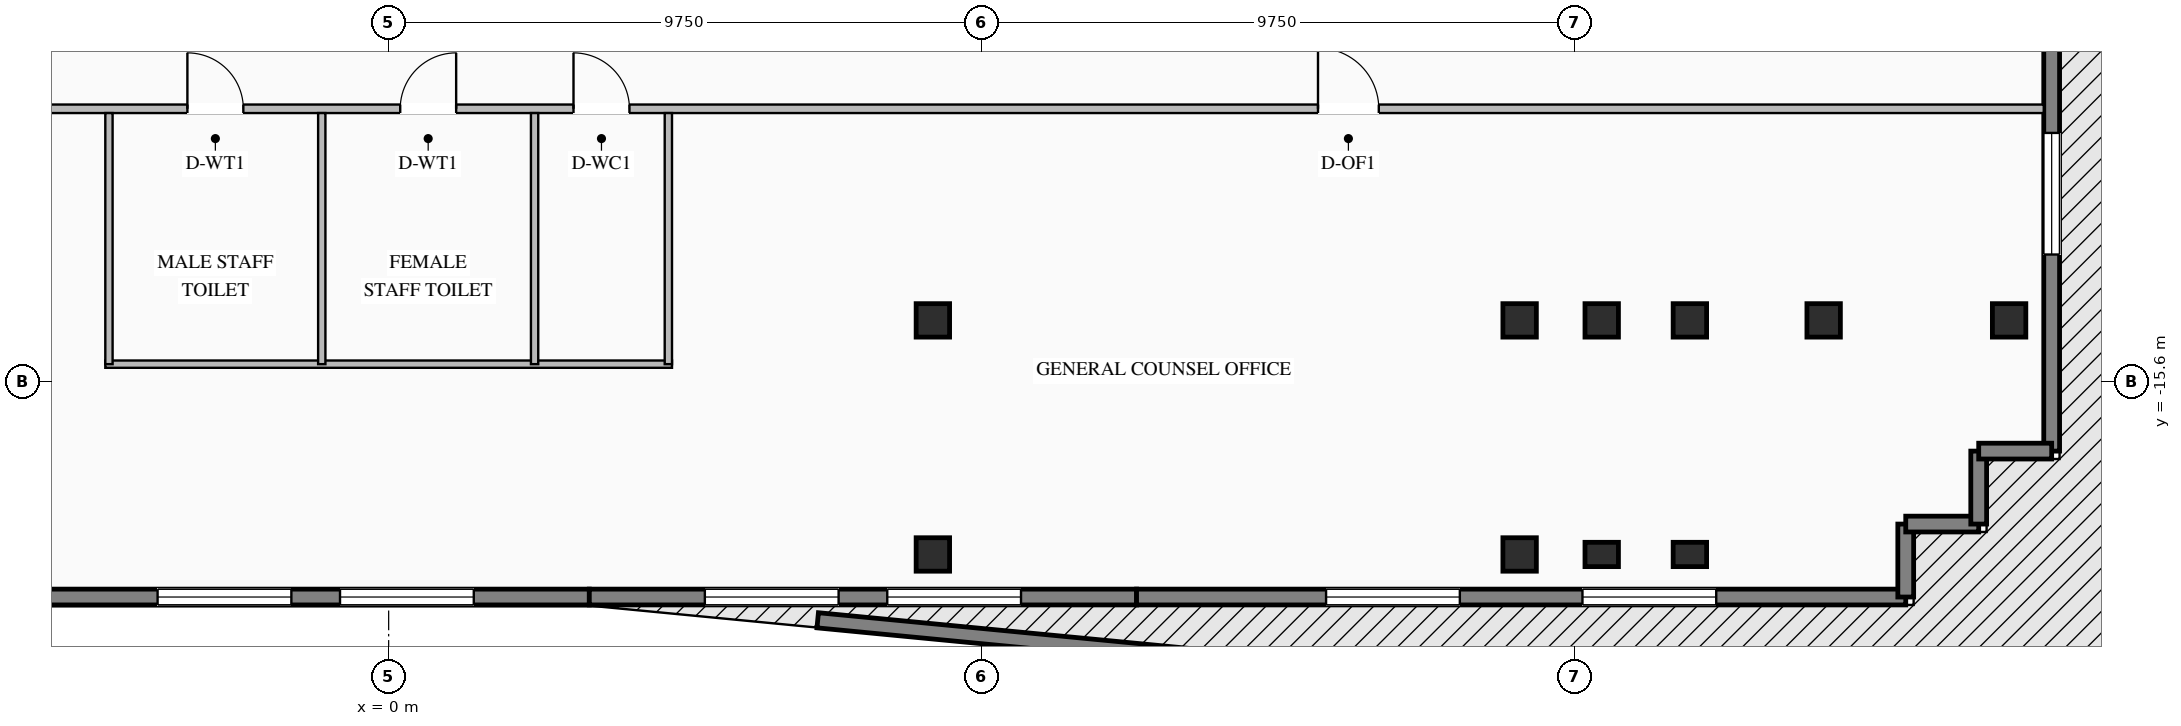
"""IFC4 building model, lengths in metres.
Left out: names, types, materials, properties, quantities, classifications, styles, units other than length and angle.
Written with IfcOpenShell. Run it as: python <this file> out.ifc"""

import sys

from ifc_helpers import new_model, si_unit, direction, frame, frame_2d, origin, origin_2d, place, context, subcontext, project, spatial, rectangle, i_section, extrude, element, fill, save


model = new_model("IFC4")
c1 = context("Model", 3, precision=1e-05, world=origin(), true_north=direction((0.0, 1.0)))
c2 = subcontext(c1, "Body", "Model", "MODEL_VIEW")
j1 = project(units=[si_unit("LENGTHUNIT", "METRE"), si_unit("PLANEANGLEUNIT", "RADIAN")], contexts=[c1])
p1 = place(None, origin())
s1 = spatial("IfcSite", under=j1, at=p1, CompositionType="ELEMENT")
p2 = place(p1, origin())
s2 = spatial("IfcBuilding", under=s1, at=p2, CompositionType="ELEMENT")
p3 = place(p2, frame((0.0, 0.0, 204.3)))
s3 = spatial("IfcBuildingStorey", under=s2, at=p3, CompositionType="ELEMENT", Elevation=204.3)
for number, where, z_axis, x_axis in (
    (1, (8.95, -14.6, 0.0), (0.0, 0.0, 1.0), (1.0, 0.0, 0.0)),
    (2, (18.6, -14.6, 0.0), (0.0, 0.0, 1.0), (1.0, 0.0, 0.0)),
    (3, (19.95, -14.6, 0.0), (0.0, 0.0, 1.0), (1.0, 0.0, 0.0)),
    (4, (21.4, -14.6, 0.0), (0.0, 0.0, 1.0), (1.0, 0.0, 0.0)),
    (5, (23.6, -14.6, 0.0), (0.0, 0.0, 1.0), (1.0, 0.0, 0.0)),
    (6, (8.95, -18.45, 0.0), (0.0, 0.0, 1.0), (1.0, 0.0, 0.0)),
):
    element("IfcColumn", number, at=place(p3, frame(where, z_axis=z_axis, x_axis=x_axis)), inside=s3, PredefinedType="COLUMN", context=c2, shape_type="SweptSolid", body=[
        extrude(i_section(OverallWidth=0.55, OverallDepth=0.55, WebThickness=0.024, FlangeThickness=0.036, at=origin_2d()), origin(), (0.0, 0.0, 1.0), 4.2),
    ])
for number, where, z_axis, x_axis in (
    (7, (18.6, -18.45, -0.28), (0.0, 0.0, 1.0), (1.0, 0.0, 0.0)),
    (8, (26.65, -14.6, -0.28), (0.0, 0.0, 1.0), (1.0, 0.0, 0.0)),
):
    element("IfcColumn", number, at=place(p3, frame(where, z_axis=z_axis, x_axis=x_axis)), inside=s3, PredefinedType="COLUMN", context=c2, shape_type="SweptSolid", body=[
        extrude(i_section(OverallWidth=0.55, OverallDepth=0.55, WebThickness=0.024, FlangeThickness=0.036, at=origin_2d()), origin(), (0.0, 0.0, 1.0), 4.48),
    ])
for number, where, z_axis, x_axis in (
    (9, (19.95, -18.45, -0.28), (0.0, 0.0, 1.0), (1.0, 0.0, 0.0)),
    (10, (21.4, -18.45, -0.28), (0.0, 0.0, 1.0), (1.0, 0.0, 0.0)),
):
    element("IfcColumn", number, at=place(p3, frame(where, z_axis=z_axis, x_axis=x_axis)), inside=s3, PredefinedType="PILASTER", context=c2, shape_type="SweptSolid", body=[
        extrude(rectangle(XDim=0.55, YDim=0.4, at=origin_2d()), origin(), (0.0, 0.0, 1.0), 4.48),
    ])
p4 = place(p3, frame((3.3, -19.15, 0.0), z_axis=(0.0, 0.0, 1.0), x_axis=(-1.0, 0.0, 0.0)))
e11 = element("IfcWall", 11, at=p4, inside=s3, PredefinedType="STANDARD", context=c2, shape_type="SweptSolid", body=[
    extrude(rectangle(XDim=9.0, YDim=0.26, at=frame_2d((4.5, 0.0))), origin(), (0.0, 0.0, 1.0), 4.0),
])
p5 = place(p4, frame((1.9, 0.0, 0.76)))
e12 = element("IfcOpeningElement", 12, at=p5, cuts=e11, PredefinedType="OPENING", context=c2, shape_type="SweptSolid", body=[
    extrude(rectangle(XDim=2.2, YDim=2.25, at=frame_2d((1.1, 1.125))), frame((0.0, 0.14, 0.0), z_axis=(0.0, -1.0, 0.0), x_axis=(1.0, 0.0, 0.0)), (0.0, 0.0, 1.0), 0.28),
])
p6 = place(p4, frame((4.9, 0.0, 0.76)))
e13 = element("IfcOpeningElement", 13, at=p6, cuts=e11, PredefinedType="OPENING", context=c2, shape_type="SweptSolid", body=[
    extrude(rectangle(XDim=2.2, YDim=2.25, at=frame_2d((1.1, 1.125))), frame((0.0, 0.14, 0.0), z_axis=(0.0, -1.0, 0.0), x_axis=(1.0, 0.0, 0.0)), (0.0, 0.0, 1.0), 0.28),
])
p7 = place(p3, frame((12.3, -19.15, 0.0), z_axis=(0.0, 0.0, 1.0), x_axis=(-1.0, 0.0, 0.0)))
e14 = element("IfcWall", 14, at=p7, inside=s3, PredefinedType="STANDARD", context=c2, shape_type="SweptSolid", body=[
    extrude(rectangle(XDim=9.0, YDim=0.26, at=frame_2d((4.5, 0.0))), origin(), (0.0, 0.0, 1.0), 4.0),
])
p8 = place(p7, frame((1.9, 0.0, 0.76)))
e15 = element("IfcOpeningElement", 15, at=p8, cuts=e14, PredefinedType="OPENING", context=c2, shape_type="SweptSolid", body=[
    extrude(rectangle(XDim=2.2, YDim=2.25, at=frame_2d((1.1, 1.125))), frame((0.0, 0.14, 0.0), z_axis=(0.0, -1.0, 0.0), x_axis=(1.0, 0.0, 0.0)), (0.0, 0.0, 1.0), 0.28),
])
p9 = place(p7, frame((4.9, 0.0, 0.76)))
e16 = element("IfcOpeningElement", 16, at=p9, cuts=e14, PredefinedType="OPENING", context=c2, shape_type="SweptSolid", body=[
    extrude(rectangle(XDim=2.2, YDim=2.25, at=frame_2d((1.1, 1.125))), frame((0.0, 0.14, 0.0), z_axis=(0.0, -1.0, 0.0), x_axis=(1.0, 0.0, 0.0)), (0.0, 0.0, 1.0), 0.28),
])
p10 = place(p3, frame((24.95, -19.15, 0.0), z_axis=(0.0, 0.0, 1.0), x_axis=(-1.0, 0.0, 0.0)))
e17 = element("IfcWall", 17, at=p10, inside=s3, PredefinedType="STANDARD", context=c2, shape_type="SweptSolid", body=[
    extrude(rectangle(XDim=12.65, YDim=0.26, at=frame_2d((6.325, 0.0))), origin(), (0.0, 0.0, 1.0), 4.0),
])
p11 = place(p10, frame((3.117, 0.0, 0.76)))
e18 = element("IfcOpeningElement", 18, at=p11, cuts=e17, PredefinedType="OPENING", context=c2, shape_type="SweptSolid", body=[
    extrude(rectangle(XDim=2.2, YDim=2.25, at=frame_2d((1.1, 1.125))), frame((0.0, 0.14, 0.0), z_axis=(0.0, -1.0, 0.0), x_axis=(1.0, 0.0, 0.0)), (0.0, 0.0, 1.0), 0.28),
])
p12 = place(p10, frame((7.333, 0.0, 0.76)))
e19 = element("IfcOpeningElement", 19, at=p12, cuts=e17, PredefinedType="OPENING", context=c2, shape_type="SweptSolid", body=[
    extrude(rectangle(XDim=2.2, YDim=2.25, at=frame_2d((1.1, 1.125))), frame((0.0, 0.14, 0.0), z_axis=(0.0, -1.0, 0.0), x_axis=(1.0, 0.0, 0.0)), (0.0, 0.0, 1.0), 0.28),
])
p13 = place(p3, frame((27.35, -0.9, 0.0), z_axis=(0.0, 0.0, 1.0), x_axis=(0.0, -1.0, 0.0)))
e20 = element("IfcWall", 20, at=p13, inside=s3, PredefinedType="STANDARD", context=c2, shape_type="SweptSolid", body=[
    extrude(rectangle(XDim=15.85, YDim=0.26, at=frame_2d((7.925, 0.0))), origin(), (0.0, 0.0, 1.0), 4.0),
])
p14 = place(p13, frame((4.283, 0.0, 0.76)))
e21 = element("IfcOpeningElement", 21, at=p14, cuts=e20, PredefinedType="OPENING", context=c2, shape_type="SweptSolid", body=[
    extrude(rectangle(XDim=2.0, YDim=2.05, at=frame_2d((1.0, 1.025))), frame((0.0, 0.14, 0.0), z_axis=(0.0, -1.0, 0.0), x_axis=(1.0, 0.0, 0.0)), (0.0, 0.0, 1.0), 0.28),
])
p15 = place(p13, frame((10.617, 0.0, 0.76)))
e22 = element("IfcOpeningElement", 22, at=p15, cuts=e20, PredefinedType="OPENING", context=c2, shape_type="SweptSolid", body=[
    extrude(rectangle(XDim=2.0, YDim=2.05, at=frame_2d((1.0, 1.025))), frame((0.0, 0.14, 0.0), z_axis=(0.0, -1.0, 0.0), x_axis=(1.0, 0.0, 0.0)), (0.0, 0.0, 1.0), 0.28),
])
for number, where, z_axis, x_axis in (
    (23, (24.95, -19.15, 0.0), (0.0, 0.0, 1.0), (0.0, 1.0, 0.0)),
    (24, (24.95, -17.95, 0.0), (0.0, 0.0, 1.0), (1.0, 0.0, 0.0)),
    (25, (26.15, -17.95, 0.0), (0.0, 0.0, 1.0), (0.0, 1.0, 0.0)),
):
    element("IfcWall", number, at=place(p3, frame(where, z_axis=z_axis, x_axis=x_axis)), inside=s3, PredefinedType="STANDARD", context=c2, shape_type="SweptSolid", body=[
        extrude(rectangle(XDim=1.2, YDim=0.26, at=frame_2d((0.6, 0.0))), origin(), (0.0, 0.0, 1.0), 4.0),
    ])
p16 = place(p3, frame((26.15, -16.75, 0.0), z_axis=(0.0, 0.0, 1.0), x_axis=(1.0, 0.0, 0.0)))
e26 = element("IfcWall", 26, at=p16, inside=s3, PredefinedType="STANDARD", context=c2, shape_type="SweptSolid", body=[
    extrude(rectangle(XDim=1.2, YDim=0.26, at=frame_2d((0.6, 0.0))), origin(), (0.0, 0.0, 1.0), 4.0),
])
p17 = place(p3, frame((29.579, -21.701, 0.0), z_axis=(0.0, 0.0, 1.0), x_axis=(-0.995396348801, 0.095844190195, 0.0)))
e27 = element("IfcWall", 27, at=p17, inside=s3, PredefinedType="PARAPET", context=c2, shape_type="SweptSolid", body=[
    extrude(rectangle(XDim=22.627, YDim=0.25, at=frame_2d((11.314, 0.0))), origin(), (0.0, 0.0, 1.0), 1.2),
])
p18 = place(p3, frame((-29.62, -11.12, 0.0), z_axis=(0.0, 0.0, 1.0), x_axis=(1.0, 0.0, 0.0)))
e28 = element("IfcWall", 28, at=p18, inside=s3, PredefinedType="STANDARD", context=c2, shape_type="SweptSolid", body=[
    extrude(rectangle(XDim=56.84, YDim=0.14, at=frame_2d((28.42, 0.0))), origin(), (0.0, 0.0, 1.0), 4.0),
])
p19 = place(p18, frame((26.31, 0.0, 0.0)))
e29 = element("IfcOpeningElement", 29, at=p19, cuts=e28, PredefinedType="OPENING", context=c2, shape_type="SweptSolid", body=[
    extrude(rectangle(XDim=0.92, YDim=2.08, at=frame_2d((0.46, 1.04))), frame((0.0, 0.08, 0.0), z_axis=(0.0, -1.0, 0.0), x_axis=(1.0, 0.0, 0.0)), (0.0, 0.0, 1.0), 0.16),
])
p20 = place(p18, frame((29.81, 0.0, 0.0)))
e30 = element("IfcOpeningElement", 30, at=p20, cuts=e28, PredefinedType="OPENING", context=c2, shape_type="SweptSolid", body=[
    extrude(rectangle(XDim=0.92, YDim=2.08, at=frame_2d((0.46, 1.04))), frame((0.0, 0.08, 0.0), z_axis=(0.0, -1.0, 0.0), x_axis=(1.0, 0.0, 0.0)), (0.0, 0.0, 1.0), 0.16),
])
p21 = place(p18, frame((32.66, 0.0, 0.0)))
e31 = element("IfcOpeningElement", 31, at=p21, cuts=e28, PredefinedType="OPENING", context=c2, shape_type="SweptSolid", body=[
    extrude(rectangle(XDim=0.92, YDim=2.08, at=frame_2d((0.46, 1.04))), frame((0.0, 0.08, 0.0), z_axis=(0.0, -1.0, 0.0), x_axis=(1.0, 0.0, 0.0)), (0.0, 0.0, 1.0), 0.16),
])
p22 = place(p18, frame((12.136, 0.0, 0.0)))
e32 = element("IfcOpeningElement", 32, at=p22, cuts=e28, PredefinedType="OPENING", context=c2, shape_type="SweptSolid", body=[
    extrude(rectangle(XDim=1.0, YDim=2.08, at=frame_2d((0.5, 1.04))), frame((0.0, 0.08, 0.0), z_axis=(0.0, -1.0, 0.0), x_axis=(1.0, 0.0, 0.0)), (0.0, 0.0, 1.0), 0.16),
])
p23 = place(p18, frame((44.904, 0.0, 0.0)))
e33 = element("IfcOpeningElement", 33, at=p23, cuts=e28, PredefinedType="OPENING", context=c2, shape_type="SweptSolid", body=[
    extrude(rectangle(XDim=1.0, YDim=2.08, at=frame_2d((0.5, 1.04))), frame((0.0, 0.08, 0.0), z_axis=(0.0, -1.0, 0.0), x_axis=(1.0, 0.0, 0.0)), (0.0, 0.0, 1.0), 0.16),
])
p24 = place(p3, frame((-4.66, -15.32, 0.0), z_axis=(0.0, 0.0, 1.0), x_axis=(1.0, 0.0, 0.0)))
e34 = element("IfcWall", 34, at=p24, inside=s3, PredefinedType="STANDARD", context=c2, shape_type="SweptSolid", body=[
    extrude(rectangle(XDim=9.32, YDim=0.12, at=frame_2d((4.66, 0.0))), origin(), (0.0, 0.0, 1.0), 4.0),
])
for number, where, z_axis, x_axis in (
    (35, (-4.6, -15.32, 0.0), (0.0, 0.0, 1.0), (0.0, 1.0, 0.0)),
    (36, (-1.1, -15.32, 0.0), (0.0, 0.0, 1.0), (0.0, 1.0, 0.0)),
    (37, (2.4, -15.32, 0.0), (0.0, 0.0, 1.0), (0.0, 1.0, 0.0)),
    (38, (4.6, -15.32, 0.0), (0.0, 0.0, 1.0), (0.0, 1.0, 0.0)),
):
    element("IfcWall", number, at=place(p3, frame(where, z_axis=z_axis, x_axis=x_axis)), inside=s3, PredefinedType="STANDARD", context=c2, shape_type="SweptSolid", body=[
        extrude(rectangle(XDim=4.13, YDim=0.12, at=frame_2d((2.065, 0.0))), origin(), (0.0, 0.0, 1.0), 4.0),
    ])
p25 = place(p5, origin())
e39 = element("IfcWindow", 39, at=p25, inside=s3, PartitioningType="DOUBLE_PANEL_VERTICAL", PredefinedType="WINDOW", context=c2, shape_type="SweptSolid", body=[
    extrude(rectangle(XDim=2.2, YDim=2.25, at=frame_2d((1.1, 1.125))), frame((0.0, 0.03, 0.0), z_axis=(0.0, -1.0, 0.0), x_axis=(1.0, 0.0, 0.0)), (0.0, 0.0, 1.0), 0.06),
])
fill(e12, e39)
p26 = place(p6, origin())
e40 = element("IfcWindow", 40, at=p26, inside=s3, PartitioningType="DOUBLE_PANEL_VERTICAL", PredefinedType="WINDOW", context=c2, shape_type="SweptSolid", body=[
    extrude(rectangle(XDim=2.2, YDim=2.25, at=frame_2d((1.1, 1.125))), frame((0.0, 0.03, 0.0), z_axis=(0.0, -1.0, 0.0), x_axis=(1.0, 0.0, 0.0)), (0.0, 0.0, 1.0), 0.06),
])
fill(e13, e40)
p27 = place(p8, origin())
e41 = element("IfcWindow", 41, at=p27, inside=s3, PartitioningType="DOUBLE_PANEL_VERTICAL", PredefinedType="WINDOW", context=c2, shape_type="SweptSolid", body=[
    extrude(rectangle(XDim=2.2, YDim=2.25, at=frame_2d((1.1, 1.125))), frame((0.0, 0.03, 0.0), z_axis=(0.0, -1.0, 0.0), x_axis=(1.0, 0.0, 0.0)), (0.0, 0.0, 1.0), 0.06),
])
fill(e15, e41)
p28 = place(p9, origin())
e42 = element("IfcWindow", 42, at=p28, inside=s3, PartitioningType="DOUBLE_PANEL_VERTICAL", PredefinedType="WINDOW", context=c2, shape_type="SweptSolid", body=[
    extrude(rectangle(XDim=2.2, YDim=2.25, at=frame_2d((1.1, 1.125))), frame((0.0, 0.03, 0.0), z_axis=(0.0, -1.0, 0.0), x_axis=(1.0, 0.0, 0.0)), (0.0, 0.0, 1.0), 0.06),
])
fill(e16, e42)
p29 = place(p11, origin())
e43 = element("IfcWindow", 43, at=p29, inside=s3, PartitioningType="DOUBLE_PANEL_VERTICAL", PredefinedType="WINDOW", context=c2, shape_type="SweptSolid", body=[
    extrude(rectangle(XDim=2.2, YDim=2.25, at=frame_2d((1.1, 1.125))), frame((0.0, 0.03, 0.0), z_axis=(0.0, -1.0, 0.0), x_axis=(1.0, 0.0, 0.0)), (0.0, 0.0, 1.0), 0.06),
])
fill(e18, e43)
p30 = place(p12, origin())
e44 = element("IfcWindow", 44, at=p30, inside=s3, PartitioningType="DOUBLE_PANEL_VERTICAL", PredefinedType="WINDOW", context=c2, shape_type="SweptSolid", body=[
    extrude(rectangle(XDim=2.2, YDim=2.25, at=frame_2d((1.1, 1.125))), frame((0.0, 0.03, 0.0), z_axis=(0.0, -1.0, 0.0), x_axis=(1.0, 0.0, 0.0)), (0.0, 0.0, 1.0), 0.06),
])
fill(e19, e44)
p31 = place(p15, origin())
e45 = element("IfcWindow", 45, at=p31, inside=s3, PartitioningType="DOUBLE_PANEL_VERTICAL", PredefinedType="WINDOW", context=c2, shape_type="SweptSolid", body=[
    extrude(rectangle(XDim=2.0, YDim=2.05, at=frame_2d((1.0, 1.025))), frame((0.0, 0.03, 0.0), z_axis=(0.0, -1.0, 0.0), x_axis=(1.0, 0.0, 0.0)), (0.0, 0.0, 1.0), 0.06),
])
fill(e22, e45)
p32 = place(p19, origin())
e46 = element("IfcDoor", 46, at=p32, inside=s3, OperationType="SINGLE_SWING_LEFT", PredefinedType="DOOR", context=c2, shape_type="SweptSolid", body=[
    extrude(rectangle(XDim=0.92, YDim=2.08, at=frame_2d((0.46, 1.04))), frame((0.0, 0.025, 0.0), z_axis=(0.0, -1.0, 0.0), x_axis=(1.0, 0.0, 0.0)), (0.0, 0.0, 1.0), 0.05),
])
fill(e29, e46)
p33 = place(p20, origin())
e47 = element("IfcDoor", 47, at=p33, inside=s3, OperationType="SINGLE_SWING_RIGHT", PredefinedType="DOOR", context=c2, shape_type="SweptSolid", body=[
    extrude(rectangle(XDim=0.92, YDim=2.08, at=frame_2d((0.46, 1.04))), frame((0.0, 0.025, 0.0), z_axis=(0.0, -1.0, 0.0), x_axis=(1.0, 0.0, 0.0)), (0.0, 0.0, 1.0), 0.05),
])
fill(e30, e47)
p34 = place(p21, origin())
e48 = element("IfcDoor", 48, at=p34, inside=s3, OperationType="SINGLE_SWING_LEFT", PredefinedType="DOOR", context=c2, shape_type="SweptSolid", body=[
    extrude(rectangle(XDim=0.92, YDim=2.08, at=frame_2d((0.46, 1.04))), frame((0.0, 0.025, 0.0), z_axis=(0.0, -1.0, 0.0), x_axis=(1.0, 0.0, 0.0)), (0.0, 0.0, 1.0), 0.05),
])
fill(e31, e48)
p35 = place(p23, origin())
e49 = element("IfcDoor", 49, at=p35, inside=s3, OperationType="SINGLE_SWING_LEFT", PredefinedType="DOOR", context=c2, shape_type="SweptSolid", body=[
    extrude(rectangle(XDim=1.0, YDim=2.08, at=frame_2d((0.5, 1.04))), frame((0.0, 0.025, 0.0), z_axis=(0.0, -1.0, 0.0), x_axis=(1.0, 0.0, 0.0)), (0.0, 0.0, 1.0), 0.05),
])
fill(e33, e49)
save(model, sys.argv[1])
